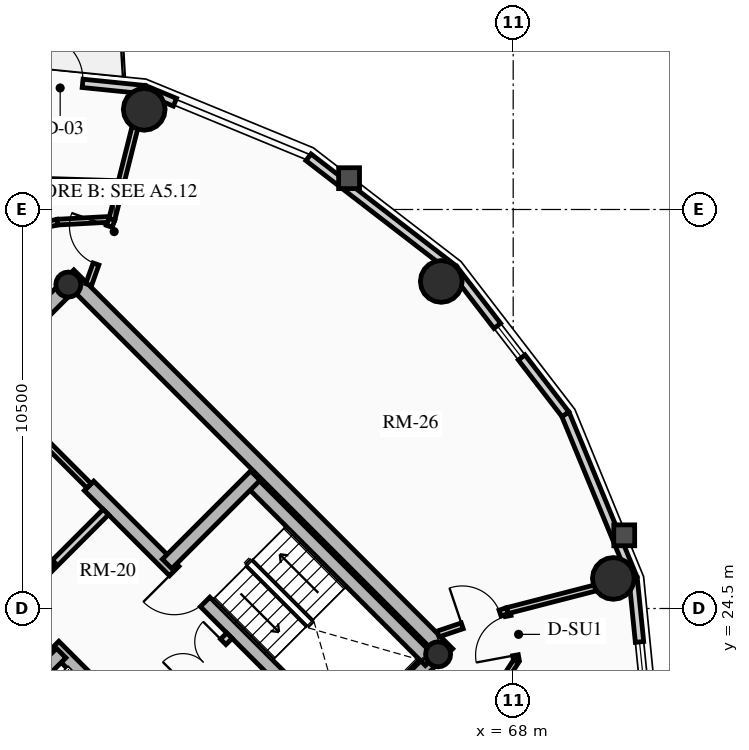
"""IFC4 building model, lengths in metres.
Left out: names, types, materials, properties, quantities, classifications, styles, units other than length and angle.
Written with IfcOpenShell. Run it as: python <this file> out.ifc"""

import sys

from ifc_helpers import new_model, si_unit, direction, frame, frame_2d, origin, origin_2d, place, context, subcontext, project, spatial, rectangle, circle, hollow_circle, extrude, source, transform, mapped, element, fill, save


model = new_model("IFC4")
c1 = context("Model", 3, precision=1e-05, world=origin(), true_north=direction((0.0, 1.0)))
c2 = subcontext(c1, "Body", "Model", "MODEL_VIEW")
j1 = project(units=[si_unit("LENGTHUNIT", "METRE"), si_unit("PLANEANGLEUNIT", "RADIAN")], contexts=[c1])
p1 = place(None, origin())
s1 = spatial("IfcSite", under=j1, at=p1, CompositionType="ELEMENT")
p2 = place(p1, origin())
s2 = spatial("IfcBuilding", under=s1, at=p2, CompositionType="ELEMENT")
p3 = place(p2, frame((0.0, 0.0, 217.03)))
s3 = spatial("IfcBuildingStorey", under=s2, at=p3, CompositionType="ELEMENT", Elevation=217.03)
for number, where, z_axis, x_axis in (
    (1, (58.702, 15.732, 0.0), (0.0, 0.0, 1.0), (-0.707, 0.707, 0.0)),
    (2, (66.268, 23.298, 0.0), (0.0, 0.0, 1.0), (-0.707, 0.707, 0.0)),
):
    element("IfcWall", number, at=place(p3, frame(where, z_axis=z_axis, x_axis=x_axis)), inside=s3, PredefinedType="SHEAR", context=c2, shape_type="SweptSolid", body=[
        extrude(rectangle(XDim=14.1, YDim=0.4, at=frame_2d((7.05, 0.0))), origin(), (0.0, 0.0, 1.0), 2.91),
    ])
p4 = place(p3, frame((58.561, 15.873, 0.0), z_axis=(0.0, 0.0, 1.0), x_axis=(0.707106781187, 0.707106781187, 0.0)))
e3 = element("IfcWall", 3, at=p4, inside=s3, PredefinedType="SHEAR", context=c2, shape_type="SweptSolid", body=[
    extrude(rectangle(XDim=10.7, YDim=0.4, at=frame_2d((5.35, 0.0))), origin(), (0.0, 0.0, 1.0), 2.91),
])
m1 = source(origin(), c2, "Body", "SweptSolid", [
    extrude(rectangle(XDim=1.5, YDim=2.02, at=frame_2d((0.75, 1.01))), frame((0.0, 0.21, 0.0), z_axis=(0.0, -1.0, 0.0), x_axis=(1.0, 0.0, 0.0)), (0.0, 0.0, 1.0), 0.42),
])
p5 = place(p4, frame((5.45, 0.0, 0.0)))
e4 = element("IfcOpeningElement", 4, at=p5, cuts=e3, PredefinedType="OPENING", context=c2, shape_type="MappedRepresentation", body=[
    mapped(m1, transform((0.0, 0.0, 0.0), x_axis=(1.0, 0.0, 0.0), y_axis=(0.0, 1.0, 0.0), z_axis=(0.0, 0.0, 1.0), scale=1.0)),
])
p6 = place(p3, frame((48.873, 25.561, 0.0), z_axis=(0.0, 0.0, 1.0), x_axis=(0.707106781187, 0.707106781187, 0.0)))
e5 = element("IfcWall", 5, at=p6, inside=s3, PredefinedType="SHEAR", context=c2, shape_type="SweptSolid", body=[
    extrude(rectangle(XDim=10.7, YDim=0.4, at=frame_2d((5.35, 0.0))), origin(), (0.0, 0.0, 1.0), 2.91),
])
p7 = place(p6, frame((4.6, 0.0, 0.0)))
e6 = element("IfcOpeningElement", 6, at=p7, cuts=e5, PredefinedType="OPENING", context=c2, shape_type="MappedRepresentation", body=[
    mapped(m1, transform((0.0, 0.0, 0.0), x_axis=(1.0, 0.0, 0.0), y_axis=(0.0, 1.0, 0.0), z_axis=(0.0, 0.0, 1.0), scale=1.0)),
])
p8 = place(p3, frame((61.06, 18.373, 0.0), z_axis=(0.0, 0.0, 1.0), x_axis=(-0.707106781187, 0.707106781187, 0.0)))
e7 = element("IfcWall", 7, at=p8, inside=s3, PredefinedType="SHEAR", context=c2, shape_type="SweptSolid", body=[
    extrude(rectangle(XDim=13.7, YDim=0.35, at=frame_2d((6.85, 0.0))), origin(), (0.0, 0.0, 1.0), 2.91),
])
m2 = source(origin(), c2, "Body", "SweptSolid", [
    extrude(rectangle(XDim=1.1, YDim=2.015, at=frame_2d((0.55, 1.007))), frame((0.0, 0.185, 0.0), z_axis=(0.0, -1.0, 0.0), x_axis=(1.0, 0.0, 0.0)), (0.0, 0.0, 1.0), 0.37),
])
p9 = place(p8, frame((4.85, 0.0, 0.0)))
e8 = element("IfcOpeningElement", 8, at=p9, cuts=e7, PredefinedType="OPENING", context=c2, shape_type="MappedRepresentation", body=[
    mapped(m2, transform((0.0, 0.0, 0.0), x_axis=(1.0, 0.0, 0.0), y_axis=(0.0, 1.0, 0.0), z_axis=(0.0, 0.0, 1.0), scale=1.0)),
])
p10 = place(p8, frame((0.625, 0.0, 0.0)))
e9 = element("IfcOpeningElement", 9, at=p10, cuts=e7, PredefinedType="OPENING", context=c2, shape_type="MappedRepresentation", body=[
    mapped(m2, transform((0.0, 0.0, 0.0), x_axis=(1.0, 0.0, 0.0), y_axis=(0.0, 1.0, 0.0), z_axis=(0.0, 0.0, 1.0), scale=1.0)),
])
p11 = place(p8, frame((2.625, 0.0, 0.0)))
e10 = element("IfcOpeningElement", 10, at=p11, cuts=e7, PredefinedType="OPENING", context=c2, shape_type="MappedRepresentation", body=[
    mapped(m2, transform((0.0, 0.0, 0.0), x_axis=(1.0, 0.0, 0.0), y_axis=(0.0, 1.0, 0.0), z_axis=(0.0, 0.0, 1.0), scale=1.0)),
])
m3 = source(origin(), c2, "Body", "SweptSolid", [
    extrude(rectangle(XDim=1.15, YDim=2.02, at=frame_2d((0.575, 1.01))), frame((0.0, 0.185, 0.0), z_axis=(0.0, -1.0, 0.0), x_axis=(1.0, 0.0, 0.0)), (0.0, 0.0, 1.0), 0.37),
])
p12 = place(p8, frame((7.27, 0.0, 0.0)))
e11 = element("IfcOpeningElement", 11, at=p12, cuts=e7, PredefinedType="OPENING", context=c2, shape_type="MappedRepresentation", body=[
    mapped(m3, transform((0.0, 0.0, 0.0), x_axis=(1.0, 0.0, 0.0), y_axis=(0.0, 1.0, 0.0), z_axis=(0.0, 0.0, 1.0), scale=1.0)),
])
p13 = place(p3, frame((63.627, 20.94, 0.0), z_axis=(0.0, 0.0, 1.0), x_axis=(-0.707119496762, 0.707094065383, 0.0)))
e12 = element("IfcWall", 12, at=p13, inside=s3, PredefinedType="SHEAR", context=c2, shape_type="SweptSolid", body=[
    extrude(rectangle(XDim=9.6, YDim=0.35, at=frame_2d((4.8, 0.0))), origin(), (0.0, 0.0, 1.0), 2.91),
])
p14 = place(p13, frame((5.28, 0.0, 0.0)))
e13 = element("IfcOpeningElement", 13, at=p14, cuts=e12, PredefinedType="OPENING", context=c2, shape_type="MappedRepresentation", body=[
    mapped(m3, transform((0.0, 0.0, 0.0), x_axis=(1.0, 0.0, 0.0), y_axis=(0.0, 1.0, 0.0), z_axis=(0.0, 0.0, 1.0), scale=1.0)),
])
p15 = place(p3, frame((53.784, 21.003, 0.0), z_axis=(0.0, 0.0, 1.0), x_axis=(0.707106781187, 0.707106781187, 0.0)))
e14 = element("IfcWall", 14, at=p15, inside=s3, PredefinedType="SHEAR", context=c2, shape_type="SweptSolid", body=[
    extrude(rectangle(XDim=3.285, YDim=0.35, at=frame_2d((1.643, 0.0))), origin(), (0.0, 0.0, 1.0), 2.91),
])
p16 = place(p3, frame((65.812, 23.125, 0.0), z_axis=(0.0, 0.0, 1.0), x_axis=(-0.707106781187, 0.707106781187, 0.0)))
e15 = element("IfcWall", 15, at=p16, inside=s3, PredefinedType="SHEAR", context=c2, shape_type="SweptSolid", body=[
    extrude(rectangle(XDim=6.695, YDim=0.35, at=frame_2d((3.348, 0.0))), origin(), (0.0, 0.0, 1.0), 2.91),
])
p17 = place(p3, frame((58.893, 25.674, 0.0), z_axis=(0.0, 0.0, 1.0), x_axis=(0.707106781187, 0.707106781187, 0.0)))
e16 = element("IfcWall", 16, at=p17, inside=s3, PredefinedType="SHEAR", context=c2, shape_type="SweptSolid", body=[
    extrude(rectangle(XDim=3.285, YDim=0.35, at=frame_2d((1.643, 0.0))), origin(), (0.0, 0.0, 1.0), 2.91),
])
for number, where, z_axis, x_axis in (
    (17, (66.024, 23.294, 0.0), (0.0, 0.0, 1.0), (0.707, 0.707, 0.0)),
    (18, (56.294, 33.024, 0.0), (0.0, 0.0, 1.0), (0.707, 0.707, 0.0)),
):
    element("IfcColumn", number, at=place(p3, frame(where, z_axis=z_axis, x_axis=x_axis)), inside=s3, PredefinedType="COLUMN", context=c2, shape_type="SweptSolid", body=[
        extrude(hollow_circle(Radius=0.33, WallThickness=0.025, at=origin_2d()), origin(), (0.0, 0.0, 1.0), 2.91),
    ])
for number, where, z_axis, x_axis in (
    (19, (66.107, 33.107, 0.0), (0.0, 0.0, 1.0), (1.0, 0.0, 0.0)),
    (20, (58.291, 37.635, 0.0), (0.0, 0.0, 1.0), (1.0, 0.0, 0.0)),
    (21, (70.635, 25.291, 0.0), (0.0, 0.0, 1.0), (1.0, 0.0, 0.0)),
):
    element("IfcColumn", number, at=place(p3, frame(where, z_axis=z_axis, x_axis=x_axis)), inside=s3, PredefinedType="USERDEFINED", context=c2, shape_type="SweptSolid", body=[
        extrude(circle(Radius=0.55, at=origin_2d()), origin(), (0.0, 0.0, 1.0), 2.91),
    ])
p18 = place(p3, frame((62.613, 36.374, 0.0), z_axis=(0.0, 0.0, 1.0), x_axis=(0.791998462147, -0.610523083886, 0.0)))
e22 = element("IfcWall", 22, at=p18, inside=s3, PredefinedType="SOLIDWALL", context=c2, shape_type="SweptSolid", body=[
    extrude(rectangle(XDim=4.82, YDim=0.22, at=frame_2d((2.41, 0.0))), origin(), (0.0, 0.0, 1.0), 2.322),
])
p19 = place(p3, frame((58.295, 38.155, 0.0), z_axis=(0.0, 0.0, 1.0), x_axis=(0.924515260676, -0.381145028536, 0.0)))
e23 = element("IfcWall", 23, at=p19, inside=s3, PredefinedType="SOLIDWALL", context=c2, shape_type="SweptSolid", body=[
    extrude(rectangle(XDim=0.87, YDim=0.22, at=frame_2d((0.435, 0.0))), origin(), (0.0, 0.0, 1.0), 2.322),
])
p20 = place(p3, frame((53.9, 38.599, 0.0), z_axis=(0.0, 0.0, 1.0), x_axis=(0.994929930991, -0.100570534541, 0.0)))
e24 = element("IfcWall", 24, at=p20, inside=s3, PredefinedType="SOLIDWALL", context=c2, shape_type="SweptSolid", body=[
    extrude(rectangle(XDim=4.418, YDim=0.22, at=frame_2d((2.209, 0.0))), origin(), (0.0, 0.0, 1.0), 2.322),
])
m4 = source(origin(), c2, "Body", "SweptSolid", [
    extrude(rectangle(XDim=1.15, YDim=2.005, at=frame_2d((0.575, 1.002))), frame((0.0, 0.12, 0.0), z_axis=(0.0, -1.0, 0.0), x_axis=(1.0, 0.0, 0.0)), (0.0, 0.0, 1.0), 0.24),
])
p21 = place(p20, frame((1.634, 0.0, 0.0)))
e25 = element("IfcOpeningElement", 25, at=p21, cuts=e24, PredefinedType="OPENING", context=c2, shape_type="MappedRepresentation", body=[
    mapped(m4, transform((0.0, 0.0, 0.0), x_axis=(1.0, 0.0, 0.0), y_axis=(0.0, 1.0, 0.0), z_axis=(0.0, 0.0, 1.0), scale=1.0)),
])
p22 = place(p3, frame((71.155, 25.295, 0.0), z_axis=(0.0, 0.0, 1.0), x_axis=(0.100570534541, -0.994929930991, 0.0)))
e26 = element("IfcWall", 26, at=p22, inside=s3, PredefinedType="SOLIDWALL", context=c2, shape_type="SweptSolid", body=[
    extrude(rectangle(XDim=4.418, YDim=0.22, at=frame_2d((2.209, 0.0))), origin(), (0.0, 0.0, 1.0), 2.322),
])
m5 = source(origin(), c2, "Body", "SweptSolid", [
    extrude(rectangle(XDim=1.05, YDim=1.3, at=frame_2d((0.525, 0.65))), frame((0.0, 0.12, 0.0), z_axis=(0.0, -1.0, 0.0), x_axis=(1.0, 0.0, 0.0)), (0.0, 0.0, 1.0), 0.24),
])
p23 = place(p22, frame((1.684, 0.0, 0.65)))
e27 = element("IfcOpeningElement", 27, at=p23, cuts=e26, PredefinedType="OPENING", context=c2, shape_type="MappedRepresentation", body=[
    mapped(m5, transform((0.0, 0.0, 0.0), x_axis=(1.0, 0.0, 0.0), y_axis=(0.0, 1.0, 0.0), z_axis=(0.0, 0.0, 1.0), scale=1.0)),
])
p24 = place(p3, frame((69.374, 29.613, 0.0), z_axis=(0.0, 0.0, 1.0), x_axis=(0.381309704956, -0.924447353237, 0.0)))
e28 = element("IfcWall", 28, at=p24, inside=s3, PredefinedType="SOLIDWALL", context=c2, shape_type="SweptSolid", body=[
    extrude(rectangle(XDim=4.671, YDim=0.22, at=frame_2d((2.335, 0.0))), origin(), (0.0, 0.0, 1.0), 2.322),
])
p25 = place(p3, frame((66.431, 33.431, 0.0), z_axis=(0.0, 0.0, 1.0), x_axis=(0.610523083886, -0.791998462147, 0.0)))
e29 = element("IfcWall", 29, at=p25, inside=s3, PredefinedType="SOLIDWALL", context=c2, shape_type="SweptSolid", body=[
    extrude(rectangle(XDim=4.82, YDim=0.22, at=frame_2d((2.41, 0.0))), origin(), (0.0, 0.0, 1.0), 2.322),
])
p26 = place(p25, frame((1.885, 0.0, 0.65)))
e30 = element("IfcOpeningElement", 30, at=p26, cuts=e29, PredefinedType="OPENING", context=c2, shape_type="MappedRepresentation", body=[
    mapped(m5, transform((0.0, 0.0, 0.0), x_axis=(1.0, 0.0, 0.0), y_axis=(0.0, 1.0, 0.0), z_axis=(0.0, 0.0, 1.0), scale=1.0)),
])
p27 = place(p3, frame((58.214, 21.467, 0.0), z_axis=(0.0, 0.0, 1.0), x_axis=(0.707106781187, 0.707106781187, 0.0)))
e31 = element("IfcWall", 31, at=p27, inside=s3, PredefinedType="PARTITIONING", context=c2, shape_type="SweptSolid", body=[
    extrude(rectangle(XDim=3.28, YDim=0.2, at=frame_2d((1.64, 0.0))), origin(), (0.0, 0.0, 1.0), 2.685),
])
m6 = source(origin(), c2, "Body", "SweptSolid", [
    extrude(rectangle(XDim=1.5, YDim=2.02, at=frame_2d((0.75, 1.01))), frame((0.0, 0.11, 0.0), z_axis=(0.0, -1.0, 0.0), x_axis=(1.0, 0.0, 0.0)), (0.0, 0.0, 1.0), 0.22),
])
p28 = place(p27, frame((1.55, 0.0, 0.0)))
e32 = element("IfcOpeningElement", 32, at=p28, cuts=e31, PredefinedType="OPENING", context=c2, shape_type="MappedRepresentation", body=[
    mapped(m6, transform((0.0, 0.0, 0.0), x_axis=(1.0, 0.0, 0.0), y_axis=(0.0, 1.0, 0.0), z_axis=(0.0, 0.0, 1.0), scale=1.0)),
])
p29 = place(p3, frame((54.961, 24.719, 0.0), z_axis=(0.0, 0.0, 1.0), x_axis=(0.707106781187, 0.707106781187, 0.0)))
e33 = element("IfcWall", 33, at=p29, inside=s3, PredefinedType="PARTITIONING", context=c2, shape_type="SweptSolid", body=[
    extrude(rectangle(XDim=3.28, YDim=0.2, at=frame_2d((1.64, 0.0))), origin(), (0.0, 0.0, 1.0), 2.685),
])
m7 = source(origin(), c2, "Body", "SweptSolid", [
    extrude(rectangle(XDim=0.9, YDim=2.005, at=frame_2d((0.45, 1.002))), frame((0.0, 0.11, 0.0), z_axis=(0.0, -1.0, 0.0), x_axis=(1.0, 0.0, 0.0)), (0.0, 0.0, 1.0), 0.22),
])
p30 = place(p29, frame((0.16, 0.0, 0.0)))
e34 = element("IfcOpeningElement", 34, at=p30, cuts=e33, PredefinedType="OPENING", context=c2, shape_type="MappedRepresentation", body=[
    mapped(m7, transform((0.0, 0.0, 0.0), x_axis=(1.0, 0.0, 0.0), y_axis=(0.0, 1.0, 0.0), z_axis=(0.0, 0.0, 1.0), scale=1.0)),
])
p31 = place(p3, frame((55.874, 25.631, 0.0), z_axis=(0.0, 0.0, 1.0), x_axis=(-0.707157639372, 0.707055919343, 0.0)))
e35 = element("IfcWall", 35, at=p31, inside=s3, PredefinedType="PARTITIONING", context=c2, shape_type="SweptSolid", body=[
    extrude(rectangle(XDim=2.4, YDim=0.2, at=frame_2d((1.2, 0.0))), origin(), (0.0, 0.0, 1.0), 2.685),
])
p32 = place(p3, frame((56.839, 27.728, 0.0), z_axis=(0.0, 0.0, 1.0), x_axis=(-0.707106781187, 0.707106781187, 0.0)))
e36 = element("IfcWall", 36, at=p32, inside=s3, PredefinedType="PARTITIONING", context=c2, shape_type="SweptSolid", body=[
    extrude(rectangle(XDim=3.9, YDim=0.16, at=frame_2d((1.95, 0.0))), origin(), (0.0, 0.0, 1.0), 2.685),
])
m8 = source(origin(), c2, "Body", "SweptSolid", [
    extrude(rectangle(XDim=0.9, YDim=2.005, at=frame_2d((0.45, 1.002))), frame((0.0, 0.09, 0.0), z_axis=(0.0, -1.0, 0.0), x_axis=(1.0, 0.0, 0.0)), (0.0, 0.0, 1.0), 0.18),
])
p33 = place(p32, frame((2.2, 0.0, 0.0)))
e37 = element("IfcOpeningElement", 37, at=p33, cuts=e36, PredefinedType="OPENING", context=c2, shape_type="MappedRepresentation", body=[
    mapped(m8, transform((0.0, 0.0, 0.0), x_axis=(1.0, 0.0, 0.0), y_axis=(0.0, 1.0, 0.0), z_axis=(0.0, 0.0, 1.0), scale=1.0)),
])
p34 = place(p3, frame((57.44, 34.744, 0.0), z_axis=(0.0, 0.0, 1.0), x_axis=(-0.998578025565, -0.053309725738, 0.0)))
e38 = element("IfcWall", 38, at=p34, inside=s3, PredefinedType="PARTITIONING", context=c2, shape_type="SweptSolid", body=[
    extrude(rectangle(XDim=1.433, YDim=0.15, at=frame_2d((0.717, 0.0))), origin(), (0.0, 0.0, 1.0), 2.322),
])
p35 = place(p3, frame((56.009, 34.667, 0.0), z_axis=(0.0, 0.0, 1.0), x_axis=(-0.977625498152, -0.210353001795, 0.0)))
e39 = element("IfcWall", 39, at=p35, inside=s3, PredefinedType="PARTITIONING", context=c2, shape_type="SweptSolid", body=[
    extrude(rectangle(XDim=1.538, YDim=0.15, at=frame_2d((0.769, 0.0))), origin(), (0.0, 0.0, 1.0), 2.255),
])
p36 = place(p3, frame((67.095, 21.6, 0.0), z_axis=(0.0, 0.0, 1.0), x_axis=(0.543773190184, 0.839232219137, 0.0)))
e40 = element("IfcWall", 40, at=p36, inside=s3, PredefinedType="PARTITIONING", context=c2, shape_type="SweptSolid", body=[
    extrude(rectangle(XDim=1.823, YDim=0.15, at=frame_2d((0.911, 0.0))), origin(), (0.0, 0.0, 1.0), 2.255),
])
p37 = place(p3, frame((68.086, 23.129, 0.0), z_axis=(0.0, 0.0, 1.0), x_axis=(-0.182004193146, 0.983297754334, 0.0)))
e41 = element("IfcWall", 41, at=p37, inside=s3, PredefinedType="PARTITIONING", context=c2, shape_type="SweptSolid", body=[
    extrude(rectangle(XDim=1.336, YDim=0.15, at=frame_2d((0.668, 0.0))), origin(), (0.0, 0.0, 1.0), 2.322),
])
m9 = source(origin(), c2, "Body", "SweptSolid", [
    extrude(rectangle(XDim=1.05, YDim=2.015, at=frame_2d((0.525, 1.007))), frame((0.0, 0.085, 0.0), z_axis=(0.0, -1.0, 0.0), x_axis=(1.0, 0.0, 0.0)), (0.0, 0.0, 1.0), 0.17),
])
p38 = place(p37, frame((0.143, 0.0, 0.0)))
e42 = element("IfcOpeningElement", 42, at=p38, cuts=e41, PredefinedType="OPENING", context=c2, shape_type="MappedRepresentation", body=[
    mapped(m9, transform((0.0, 0.0, 0.0), x_axis=(1.0, 0.0, 0.0), y_axis=(0.0, 1.0, 0.0), z_axis=(0.0, 0.0, 1.0), scale=1.0)),
])
p39 = place(p3, frame((57.44, 34.744, 0.0), z_axis=(0.0, 0.0, 1.0), x_axis=(0.243619816457, 0.969870808422, 0.0)))
e43 = element("IfcWall", 43, at=p39, inside=s3, PredefinedType="PARTITIONING", context=c2, shape_type="SweptSolid", body=[
    extrude(rectangle(XDim=3.496, YDim=0.16, at=frame_2d((1.748, 0.0))), origin(), (0.0, 0.0, 1.0), 2.322),
])
p40 = place(p3, frame((67.843, 24.443, 0.0), z_axis=(0.0, 0.0, 1.0), x_axis=(0.968303102463, 0.249778105048, 0.0)))
e44 = element("IfcWall", 44, at=p40, inside=s3, PredefinedType="PARTITIONING", context=c2, shape_type="SweptSolid", body=[
    extrude(rectangle(XDim=3.399, YDim=0.16, at=frame_2d((1.7, 0.0))), origin(), (0.0, 0.0, 1.0), 2.322),
])
p41 = place(p3, frame((56.828, 33.021, 0.0), z_axis=(0.0, 0.0, 1.0), x_axis=(0.334788446034, 0.942293317605, 0.0)))
e45 = element("IfcWall", 45, at=p41, inside=s3, PredefinedType="PARTITIONING", context=c2, shape_type="SweptSolid", body=[
    extrude(rectangle(XDim=1.829, YDim=0.16, at=frame_2d((0.915, 0.0))), origin(), (0.0, 0.0, 1.0), 2.255),
])
m10 = source(origin(), c2, "Body", "SweptSolid", [
    extrude(rectangle(XDim=1.05, YDim=2.015, at=frame_2d((0.525, 1.007))), frame((0.0, 0.09, 0.0), z_axis=(0.0, -1.0, 0.0), x_axis=(1.0, 0.0, 0.0)), (0.0, 0.0, 1.0), 0.18),
])
p42 = place(p41, frame((0.579, 0.0, 0.0)))
e46 = element("IfcOpeningElement", 46, at=p42, cuts=e45, PredefinedType="OPENING", context=c2, shape_type="MappedRepresentation", body=[
    mapped(m10, transform((0.0, 0.0, 0.0), x_axis=(1.0, 0.0, 0.0), y_axis=(0.0, 1.0, 0.0), z_axis=(0.0, 0.0, 1.0), scale=1.0)),
])
p43 = place(p3, frame((66.021, 23.828, 0.0), z_axis=(0.0, 0.0, 1.0), x_axis=(0.947522075691, 0.319690344049, 0.0)))
e47 = element("IfcWall", 47, at=p43, inside=s3, PredefinedType="PARTITIONING", context=c2, shape_type="SweptSolid", body=[
    extrude(rectangle(XDim=1.924, YDim=0.16, at=frame_2d((0.962, 0.0))), origin(), (0.0, 0.0, 1.0), 2.255),
])
p44 = place(p43, frame((0.674, 0.0, 0.0)))
e48 = element("IfcOpeningElement", 48, at=p44, cuts=e47, PredefinedType="OPENING", context=c2, shape_type="MappedRepresentation", body=[
    mapped(m10, transform((0.0, 0.0, 0.0), x_axis=(1.0, 0.0, 0.0), y_axis=(0.0, 1.0, 0.0), z_axis=(0.0, 0.0, 1.0), scale=1.0)),
])
p45 = place(p3, frame((57.679, 35.693, 0.0), z_axis=(0.0, 0.0, 1.0), x_axis=(-0.999526298938, 0.030776252722, 0.0)))
e49 = element("IfcWall", 49, at=p45, inside=s3, PredefinedType="PARTITIONING", context=c2, shape_type="SweptSolid", body=[
    extrude(rectangle(XDim=2.261, YDim=0.125, at=frame_2d((1.13, 0.0))), origin(), (0.0, 0.0, 1.0), 2.322),
])
m11 = source(origin(), c2, "Body", "SweptSolid", [
    extrude(rectangle(XDim=1.15, YDim=2.005, at=frame_2d((0.575, 1.002))), frame((0.0, 0.025, 0.0), z_axis=(0.0, -1.0, 0.0), x_axis=(1.0, 0.0, 0.0)), (0.0, 0.0, 1.0), 0.05),
])
p46 = place(p21, origin())
e50 = element("IfcDoor", 50, at=p46, inside=s3, OperationType="SINGLE_SWING_LEFT", PredefinedType="DOOR", context=c2, shape_type="MappedRepresentation", body=[
    mapped(m11, transform((0.0, 0.0, 0.0), x_axis=(1.0, 0.0, 0.0), y_axis=(0.0, 1.0, 0.0), z_axis=(0.0, 0.0, 1.0), scale=1.0)),
])
fill(e25, e50)
m12 = source(origin(), c2, "Body", "SweptSolid", [
    extrude(rectangle(XDim=1.05, YDim=1.3, at=frame_2d((0.525, 0.65))), frame((0.0, 0.03, 0.0), z_axis=(0.0, -1.0, 0.0), x_axis=(1.0, 0.0, 0.0)), (0.0, 0.0, 1.0), 0.06),
])
p47 = place(p23, origin())
e51 = element("IfcWindow", 51, at=p47, inside=s3, PartitioningType="SINGLE_PANEL", PredefinedType="WINDOW", context=c2, shape_type="MappedRepresentation", body=[
    mapped(m12, transform((0.0, 0.0, 0.0), x_axis=(1.0, 0.0, 0.0), y_axis=(0.0, 1.0, 0.0), z_axis=(0.0, 0.0, 1.0), scale=1.0)),
])
fill(e27, e51)
p48 = place(p26, origin())
e52 = element("IfcWindow", 52, at=p48, inside=s3, PartitioningType="SINGLE_PANEL", PredefinedType="WINDOW", context=c2, shape_type="MappedRepresentation", body=[
    mapped(m12, transform((0.0, 0.0, 0.0), x_axis=(1.0, 0.0, 0.0), y_axis=(0.0, 1.0, 0.0), z_axis=(0.0, 0.0, 1.0), scale=1.0)),
])
fill(e30, e52)
m13 = source(origin(), c2, "Body", "SweptSolid", [
    extrude(rectangle(XDim=1.15, YDim=2.02, at=frame_2d((0.575, 1.01))), frame((0.0, 0.025, 0.0), z_axis=(0.0, -1.0, 0.0), x_axis=(1.0, 0.0, 0.0)), (0.0, 0.0, 1.0), 0.05),
])
p49 = place(p12, origin())
e53 = element("IfcDoor", 53, at=p49, inside=s3, OperationType="SINGLE_SWING_LEFT", PredefinedType="DOOR", context=c2, shape_type="MappedRepresentation", body=[
    mapped(m13, transform((0.0, 0.0, 0.0), x_axis=(1.0, 0.0, 0.0), y_axis=(0.0, 1.0, 0.0), z_axis=(0.0, 0.0, 1.0), scale=1.0)),
])
fill(e11, e53)
p50 = place(p14, origin())
e54 = element("IfcDoor", 54, at=p50, inside=s3, OperationType="SINGLE_SWING_RIGHT", PredefinedType="DOOR", context=c2, shape_type="MappedRepresentation", body=[
    mapped(m13, transform((0.0, 0.0, 0.0), x_axis=(1.0, 0.0, 0.0), y_axis=(0.0, 1.0, 0.0), z_axis=(0.0, 0.0, 1.0), scale=1.0)),
])
fill(e13, e54)
m14 = source(origin(), c2, "Body", "SweptSolid", [
    extrude(rectangle(XDim=1.5, YDim=2.02, at=frame_2d((0.75, 1.01))), frame((0.0, 0.025, 0.0), z_axis=(0.0, -1.0, 0.0), x_axis=(1.0, 0.0, 0.0)), (0.0, 0.0, 1.0), 0.05),
])
p51 = place(p28, origin())
e55 = element("IfcDoor", 55, at=p51, inside=s3, OperationType="DOUBLE_DOOR_SINGLE_SWING", PredefinedType="DOOR", context=c2, shape_type="MappedRepresentation", body=[
    mapped(m14, transform((0.0, 0.0, 0.0), x_axis=(1.0, 0.0, 0.0), y_axis=(0.0, 1.0, 0.0), z_axis=(0.0, 0.0, 1.0), scale=1.0)),
])
fill(e32, e55)
m15 = source(origin(), c2, "Body", "SweptSolid", [
    extrude(rectangle(XDim=1.05, YDim=2.015, at=frame_2d((0.525, 1.007))), frame((0.0, 0.025, 0.0), z_axis=(0.0, -1.0, 0.0), x_axis=(1.0, 0.0, 0.0)), (0.0, 0.0, 1.0), 0.05),
])
p52 = place(p42, origin())
e56 = element("IfcDoor", 56, at=p52, inside=s3, OperationType="SINGLE_SWING_RIGHT", PredefinedType="DOOR", context=c2, shape_type="MappedRepresentation", body=[
    mapped(m15, transform((0.0, 0.0, 0.0), x_axis=(1.0, 0.0, 0.0), y_axis=(0.0, 1.0, 0.0), z_axis=(0.0, 0.0, 1.0), scale=1.0)),
])
fill(e46, e56)
p53 = place(p44, origin())
e57 = element("IfcDoor", 57, at=p53, inside=s3, OperationType="SINGLE_SWING_LEFT", PredefinedType="DOOR", context=c2, shape_type="MappedRepresentation", body=[
    mapped(m15, transform((0.0, 0.0, 0.0), x_axis=(1.0, 0.0, 0.0), y_axis=(0.0, 1.0, 0.0), z_axis=(0.0, 0.0, 1.0), scale=1.0)),
])
fill(e48, e57)
p54 = place(p38, origin())
e58 = element("IfcDoor", 58, at=p54, inside=s3, OperationType="SINGLE_SWING_LEFT", PredefinedType="DOOR", context=c2, shape_type="MappedRepresentation", body=[
    mapped(m15, transform((0.0, 0.0, 0.0), x_axis=(1.0, 0.0, 0.0), y_axis=(0.0, 1.0, 0.0), z_axis=(0.0, 0.0, 1.0), scale=1.0)),
])
fill(e42, e58)
save(model, sys.argv[1])
